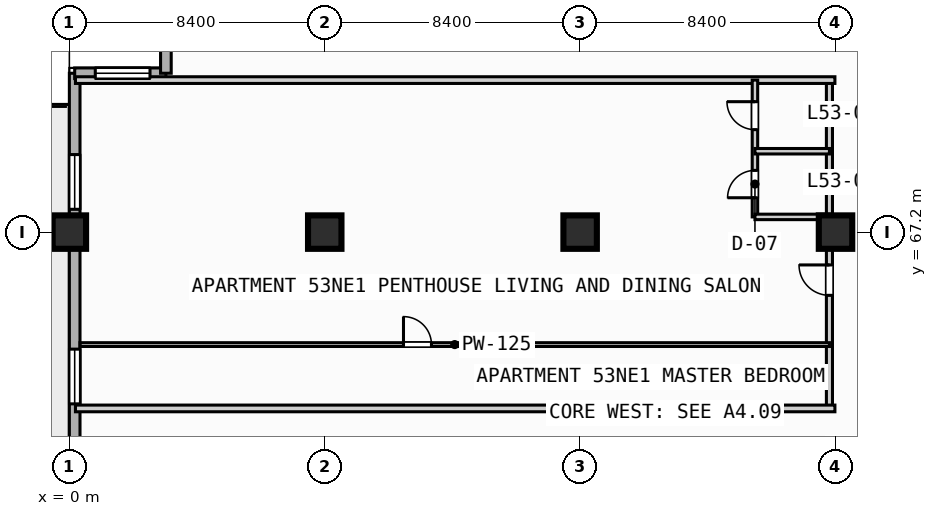
"""IFC4 building model, lengths in metres.
Left out: names, types, materials, properties, quantities, classifications, styles, units other than length and angle.
Written with IfcOpenShell. Run it as: python <this file> out.ifc"""

import sys

from ifc_helpers import new_model, si_unit, direction, frame, frame_2d, origin, origin_2d, place, context, subcontext, project, spatial, rectangle, extrude, element, fill, save


model = new_model("IFC4")
c1 = context("Model", 3, precision=1e-05, world=origin(), true_north=direction((0.0, 1.0)))
c2 = subcontext(c1, "Body", "Model", "MODEL_VIEW")
j1 = project(units=[si_unit("LENGTHUNIT", "METRE"), si_unit("PLANEANGLEUNIT", "RADIAN")], contexts=[c1])
p1 = place(None, origin())
s1 = spatial("IfcSite", under=j1, at=p1, CompositionType="ELEMENT")
p2 = place(p1, origin())
s2 = spatial("IfcBuilding", under=s1, at=p2, CompositionType="ELEMENT")
p3 = place(p2, frame((0.0, 0.0, 216.1)))
s3 = spatial("IfcBuildingStorey", under=s2, at=p3, CompositionType="ELEMENT", Elevation=216.1)
for number, where, z_axis, x_axis in (
    (1, (0.0, 67.2, 0.0), (0.0, 0.0, 1.0), (1.0, 0.0, 0.0)),
    (2, (8.4, 67.2, 0.0), (0.0, 0.0, 1.0), (1.0, 0.0, 0.0)),
    (3, (16.8, 67.2, 0.0), (0.0, 0.0, 1.0), (1.0, 0.0, 0.0)),
    (4, (25.2, 67.2, 0.0), (0.0, 0.0, 1.0), (1.0, 0.0, 0.0)),
):
    element("IfcColumn", number, at=place(p3, frame(where, z_axis=z_axis, x_axis=x_axis)), inside=s3, PredefinedType="COLUMN", context=c2, shape_type="SweptSolid", body=[
        extrude(rectangle(XDim=1.1, YDim=1.1, at=origin_2d()), origin(), (0.0, 0.0, 1.0), 3.7),
    ])
p4 = place(p3, frame((0.175, 3.175, 0.0), z_axis=(0.0, 0.0, 1.0), x_axis=(0.0, 1.0, 0.0)))
e5 = element("IfcWall", 5, at=p4, inside=s3, PredefinedType="STANDARD", context=c2, shape_type="SweptSolid", body=[
    extrude(rectangle(XDim=69.25, YDim=0.35, at=frame_2d((34.625, 0.0))), origin(), (0.0, 0.0, 1.0), 3.47),
])
p5 = place(p4, frame((42.325, 0.0, 0.0)))
e6 = element("IfcOpeningElement", 6, at=p5, cuts=e5, PredefinedType="OPENING", context=c2, shape_type="SweptSolid", body=[
    extrude(rectangle(XDim=1.4, YDim=2.2, at=frame_2d((0.7, 1.1))), frame((0.0, 0.185, 0.0), z_axis=(0.0, -1.0, 0.0), x_axis=(1.0, 0.0, 0.0)), (0.0, 0.0, 1.0), 0.37),
])
p6 = place(p4, frame((25.025, 0.0, 0.85)))
e7 = element("IfcOpeningElement", 7, at=p6, cuts=e5, PredefinedType="OPENING", context=c2, shape_type="SweptSolid", body=[
    extrude(rectangle(XDim=2.4, YDim=1.95, at=frame_2d((1.2, 0.975))), frame((0.0, 0.185, 0.0), z_axis=(0.0, -1.0, 0.0), x_axis=(1.0, 0.0, 0.0)), (0.0, 0.0, 1.0), 0.37),
])
p7 = place(p4, frame((33.725, 0.0, 0.85)))
e8 = element("IfcOpeningElement", 8, at=p7, cuts=e5, PredefinedType="OPENING", context=c2, shape_type="SweptSolid", body=[
    extrude(rectangle(XDim=1.8, YDim=1.8, at=frame_2d((0.9, 0.9))), frame((0.0, 0.185, 0.0), z_axis=(0.0, -1.0, 0.0), x_axis=(1.0, 0.0, 0.0)), (0.0, 0.0, 1.0), 0.37),
])
p8 = place(p4, frame((58.375, 0.0, 0.85)))
e9 = element("IfcOpeningElement", 9, at=p8, cuts=e5, PredefinedType="OPENING", context=c2, shape_type="SweptSolid", body=[
    extrude(rectangle(XDim=1.8, YDim=1.8, at=frame_2d((0.9, 0.9))), frame((0.0, 0.185, 0.0), z_axis=(0.0, -1.0, 0.0), x_axis=(1.0, 0.0, 0.0)), (0.0, 0.0, 1.0), 0.37),
])
p9 = place(p4, frame((64.775, 0.0, 0.85)))
e10 = element("IfcOpeningElement", 10, at=p9, cuts=e5, PredefinedType="OPENING", context=c2, shape_type="SweptSolid", body=[
    extrude(rectangle(XDim=1.8, YDim=1.8, at=frame_2d((0.9, 0.9))), frame((0.0, 0.185, 0.0), z_axis=(0.0, -1.0, 0.0), x_axis=(1.0, 0.0, 0.0)), (0.0, 0.0, 1.0), 0.37),
])
p10 = place(p3, frame((0.175, 72.425, 0.0), z_axis=(0.0, 0.0, 1.0), x_axis=(1.0, 0.0, 0.0)))
e11 = element("IfcWall", 11, at=p10, inside=s3, PredefinedType="STANDARD", context=c2, shape_type="SweptSolid", body=[
    extrude(rectangle(XDim=3.0, YDim=0.35, at=frame_2d((1.5, 0.0))), origin(), (0.0, 0.0, 1.0), 3.47),
])
p11 = place(p10, frame((0.677, 0.0, 0.85)))
e12 = element("IfcOpeningElement", 12, at=p11, cuts=e11, PredefinedType="OPENING", context=c2, shape_type="SweptSolid", body=[
    extrude(rectangle(XDim=1.8, YDim=1.8, at=frame_2d((0.9, 0.9))), frame((0.0, 0.185, 0.0), z_axis=(0.0, -1.0, 0.0), x_axis=(1.0, 0.0, 0.0)), (0.0, 0.0, 1.0), 0.37),
])
p12 = place(p3, frame((3.175, 72.425, 0.0), z_axis=(0.0, 0.0, 1.0), x_axis=(0.0, 1.0, 0.0)))
e13 = element("IfcWall", 13, at=p12, inside=s3, PredefinedType="STANDARD", context=c2, shape_type="SweptSolid", body=[
    extrude(rectangle(XDim=3.0, YDim=0.35, at=frame_2d((1.5, 0.0))), origin(), (0.0, 0.0, 1.0), 3.47),
])
p13 = place(p3, frame((25.0, 61.4, 0.0), z_axis=(0.0, 0.0, 1.0), x_axis=(0.0, 1.0, 0.0)))
e14 = element("IfcWall", 14, at=p13, inside=s3, PredefinedType="PARTITIONING", context=c2, shape_type="SweptSolid", body=[
    extrude(rectangle(XDim=10.8, YDim=0.2, at=frame_2d((5.4, 0.0))), origin(), (0.0, 0.0, 1.0), 2.82),
])
p14 = place(p13, frame((3.72, 0.0, 0.0)))
e15 = element("IfcOpeningElement", 15, at=p14, cuts=e14, PredefinedType="OPENING", context=c2, shape_type="SweptSolid", body=[
    extrude(rectangle(XDim=1.0, YDim=2.15, at=frame_2d((0.5, 1.075))), frame((0.0, 0.11, 0.0), z_axis=(0.0, -1.0, 0.0), x_axis=(1.0, 0.0, 0.0)), (0.0, 0.0, 1.0), 0.22),
])
for number, where, z_axis, x_axis in (
    (16, (0.2, 61.4, 0.0), (0.0, 0.0, 1.0), (1.0, 0.0, 0.0)),
    (17, (0.2, 72.2, 0.0), (0.0, 0.0, 1.0), (1.0, 0.0, 0.0)),
):
    element("IfcWall", number, at=place(p3, frame(where, z_axis=z_axis, x_axis=x_axis)), inside=s3, PredefinedType="PARTITIONING", context=c2, shape_type="SweptSolid", body=[
        extrude(rectangle(XDim=24.98, YDim=0.22, at=frame_2d((12.49, 0.0))), origin(), (0.0, 0.0, 1.0), 3.47),
    ])
p15 = place(p3, frame((22.55, 67.7, 0.0), z_axis=(0.0, 0.0, 1.0), x_axis=(0.0, 1.0, 0.0)))
e18 = element("IfcWall", 18, at=p15, inside=s3, PredefinedType="PLUMBINGWALL", context=c2, shape_type="SweptSolid", body=[
    extrude(rectangle(XDim=4.5, YDim=0.18, at=frame_2d((2.25, 0.0))), origin(), (0.0, 0.0, 1.0), 3.47),
])
p16 = place(p15, frame((0.63, 0.0, 0.0)))
e19 = element("IfcOpeningElement", 19, at=p16, cuts=e18, PredefinedType="OPENING", context=c2, shape_type="SweptSolid", body=[
    extrude(rectangle(XDim=0.9, YDim=2.1, at=frame_2d((0.45, 1.05))), frame((0.0, 0.1, 0.0), z_axis=(0.0, -1.0, 0.0), x_axis=(1.0, 0.0, 0.0)), (0.0, 0.0, 1.0), 0.2),
])
p17 = place(p15, frame((2.87, 0.0, 0.0)))
e20 = element("IfcOpeningElement", 20, at=p17, cuts=e18, PredefinedType="OPENING", context=c2, shape_type="SweptSolid", body=[
    extrude(rectangle(XDim=0.92, YDim=2.1, at=frame_2d((0.46, 1.05))), frame((0.0, 0.1, 0.0), z_axis=(0.0, -1.0, 0.0), x_axis=(1.0, 0.0, 0.0)), (0.0, 0.0, 1.0), 0.2),
])
for number, where, z_axis, x_axis in (
    (21, (22.55, 67.7, 0.0), (0.0, 0.0, 1.0), (1.0, 0.0, 0.0)),
    (22, (22.55, 69.86, 0.0), (0.0, 0.0, 1.0), (1.0, 0.0, 0.0)),
):
    element("IfcWall", number, at=place(p3, frame(where, z_axis=z_axis, x_axis=x_axis)), inside=s3, PredefinedType="PLUMBINGWALL", context=c2, shape_type="SweptSolid", body=[
        extrude(rectangle(XDim=2.45, YDim=0.18, at=frame_2d((1.225, 0.0))), origin(), (0.0, 0.0, 1.0), 3.47),
    ])
p18 = place(p3, frame((0.35, 63.5, 0.0), z_axis=(0.0, 0.0, 1.0), x_axis=(1.0, 0.0, 0.0)))
e23 = element("IfcWall", 23, at=p18, inside=s3, PredefinedType="PARTITIONING", context=c2, shape_type="SweptSolid", body=[
    extrude(rectangle(XDim=24.65, YDim=0.125, at=frame_2d((12.325, 0.0))), origin(), (0.0, 0.0, 1.0), 3.47),
])
p19 = place(p18, frame((10.64, 0.0, 0.0)))
e24 = element("IfcOpeningElement", 24, at=p19, cuts=e23, PredefinedType="OPENING", context=c2, shape_type="SweptSolid", body=[
    extrude(rectangle(XDim=0.92, YDim=2.1, at=frame_2d((0.46, 1.05))), frame((0.0, 0.073, 0.0), z_axis=(0.0, -1.0, 0.0), x_axis=(1.0, 0.0, 0.0)), (0.0, 0.0, 1.0), 0.145),
])
p20 = place(p8, origin())
e25 = element("IfcWindow", 25, at=p20, inside=s3, PartitioningType="SINGLE_PANEL", PredefinedType="WINDOW", context=c2, shape_type="SweptSolid", body=[
    extrude(rectangle(XDim=1.8, YDim=1.8, at=frame_2d((0.9, 0.9))), frame((0.0, 0.03, 0.0), z_axis=(0.0, -1.0, 0.0), x_axis=(1.0, 0.0, 0.0)), (0.0, 0.0, 1.0), 0.06),
])
fill(e9, e25)
p21 = place(p9, origin())
e26 = element("IfcWindow", 26, at=p21, inside=s3, PartitioningType="SINGLE_PANEL", PredefinedType="WINDOW", context=c2, shape_type="SweptSolid", body=[
    extrude(rectangle(XDim=1.8, YDim=1.8, at=frame_2d((0.9, 0.9))), frame((0.0, 0.03, 0.0), z_axis=(0.0, -1.0, 0.0), x_axis=(1.0, 0.0, 0.0)), (0.0, 0.0, 1.0), 0.06),
])
fill(e10, e26)
p22 = place(p11, origin())
e27 = element("IfcWindow", 27, at=p22, inside=s3, PartitioningType="SINGLE_PANEL", PredefinedType="WINDOW", context=c2, shape_type="SweptSolid", body=[
    extrude(rectangle(XDim=1.8, YDim=1.8, at=frame_2d((0.9, 0.9))), frame((0.0, 0.03, 0.0), z_axis=(0.0, -1.0, 0.0), x_axis=(1.0, 0.0, 0.0)), (0.0, 0.0, 1.0), 0.06),
])
fill(e12, e27)
p23 = place(p14, origin())
e28 = element("IfcDoor", 28, at=p23, inside=s3, OperationType="SINGLE_SWING_RIGHT", PredefinedType="DOOR", context=c2, shape_type="SweptSolid", body=[
    extrude(rectangle(XDim=1.0, YDim=2.15, at=frame_2d((0.5, 1.075))), frame((0.0, 0.025, 0.0), z_axis=(0.0, -1.0, 0.0), x_axis=(1.0, 0.0, 0.0)), (0.0, 0.0, 1.0), 0.05),
])
fill(e15, e28)
p24 = place(p16, origin())
e29 = element("IfcDoor", 29, at=p24, inside=s3, OperationType="SINGLE_SWING_LEFT", PredefinedType="DOOR", context=c2, shape_type="SweptSolid", body=[
    extrude(rectangle(XDim=0.9, YDim=2.1, at=frame_2d((0.45, 1.05))), frame((0.0, 0.025, 0.0), z_axis=(0.0, -1.0, 0.0), x_axis=(1.0, 0.0, 0.0)), (0.0, 0.0, 1.0), 0.05),
])
fill(e19, e29)
p25 = place(p17, origin())
e30 = element("IfcDoor", 30, at=p25, inside=s3, OperationType="SINGLE_SWING_RIGHT", PredefinedType="DOOR", context=c2, shape_type="SweptSolid", body=[
    extrude(rectangle(XDim=0.92, YDim=2.1, at=frame_2d((0.46, 1.05))), frame((0.0, 0.025, 0.0), z_axis=(0.0, -1.0, 0.0), x_axis=(1.0, 0.0, 0.0)), (0.0, 0.0, 1.0), 0.05),
])
fill(e20, e30)
p26 = place(p19, origin())
e31 = element("IfcDoor", 31, at=p26, inside=s3, OperationType="SINGLE_SWING_LEFT", PredefinedType="DOOR", context=c2, shape_type="SweptSolid", body=[
    extrude(rectangle(XDim=0.92, YDim=2.1, at=frame_2d((0.46, 1.05))), frame((0.0, 0.025, 0.0), z_axis=(0.0, -1.0, 0.0), x_axis=(1.0, 0.0, 0.0)), (0.0, 0.0, 1.0), 0.05),
])
fill(e24, e31)
save(model, sys.argv[1])
